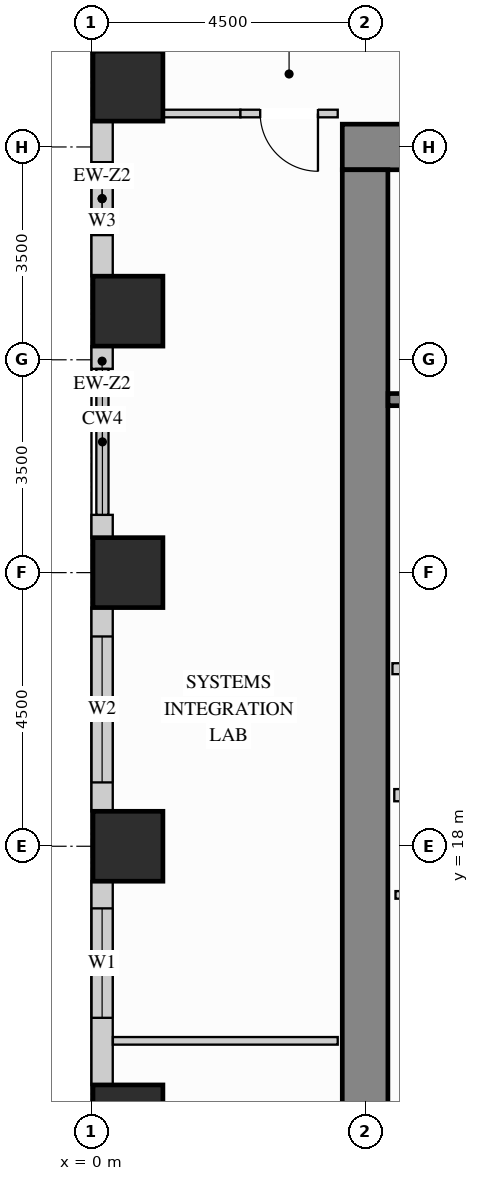
"""IFC4 building model, lengths in metres.
Left out: names, types, materials, properties, quantities, classifications, styles, units other than length and angle.
Written with IfcOpenShell. Run it as: python <this file> out.ifc"""

import sys

from ifc_helpers import new_model, si_unit, direction, frame, frame_2d, origin, origin_2d, place, context, subcontext, project, spatial, rectangle, extrude, source, transform, mapped, element, fill, save


model = new_model("IFC4")
c1 = context("Model", 3, precision=1e-05, world=origin(), true_north=direction((0.0, 1.0)))
c2 = subcontext(c1, "Body", "Model", "MODEL_VIEW")
j1 = project(units=[si_unit("LENGTHUNIT", "METRE"), si_unit("PLANEANGLEUNIT", "RADIAN")], contexts=[c1])
p1 = place(None, origin())
s1 = spatial("IfcSite", under=j1, at=p1, CompositionType="ELEMENT")
p2 = place(p1, origin())
s2 = spatial("IfcBuilding", under=s1, at=p2, CompositionType="ELEMENT")
p3 = place(p2, frame((0.0, 0.0, 77.4)))
s3 = spatial("IfcBuildingStorey", under=s2, at=p3, CompositionType="ELEMENT", Elevation=77.4)
m1 = source(origin(), c2, "Body", "SweptSolid", [
    extrude(rectangle(XDim=1.15, YDim=1.15, at=origin_2d()), origin(), (0.0, 0.0, 1.0), 3.38),
])
for number, where, z_axis, x_axis in (
    (1, (0.6, 13.5, 0.0), (0.0, 0.0, 1.0), (1.0, 0.0, 0.0)),
    (2, (0.6, 18.0, 0.0), (0.0, 0.0, 1.0), (1.0, 0.0, 0.0)),
    (3, (0.6, 22.5, 0.0), (0.0, 0.0, 1.0), (1.0, 0.0, 0.0)),
    (4, (0.6, 26.8, 0.0), (0.0, 0.0, 1.0), (1.0, 0.0, 0.0)),
    (5, (0.6, 30.5, 0.0), (0.0, 0.0, 1.0), (1.0, 0.0, 0.0)),
):
    element("IfcColumn", number, at=place(p3, frame(where, z_axis=z_axis, x_axis=x_axis)), inside=s3, PredefinedType="COLUMN", context=c2, shape_type="MappedRepresentation", body=[
        mapped(m1, transform((0.0, 0.0, 0.0), x_axis=(1.0, 0.0, 0.0), y_axis=(0.0, 1.0, 0.0), z_axis=(0.0, 0.0, 1.0))),
    ])
m2 = source(origin(), c2, "Body", "SweptSolid", [
    extrude(rectangle(XDim=10.75, YDim=0.75, at=frame_2d((5.375, 0.0))), origin(), (0.0, 0.0, 1.0), 3.38),
])
p4 = place(p3, frame((4.125, 29.5, 0.0), z_axis=(0.0, 0.0, 1.0), x_axis=(1.0, 0.0, 0.0)))
e6 = element("IfcWall", 6, at=p4, inside=s3, PredefinedType="SHEAR", context=c2, shape_type="MappedRepresentation", body=[
    mapped(m2, transform((0.0, 0.0, 0.0), x_axis=(1.0, 0.0, 0.0), y_axis=(0.0, 1.0, 0.0), z_axis=(0.0, 0.0, 1.0))),
])
m3 = source(origin(), c2, "Body", "SweptSolid", [
    extrude(rectangle(XDim=20.25, YDim=0.75, at=frame_2d((10.125, 0.0))), origin(), (0.0, 0.0, 1.0), 3.38),
])
p5 = place(p3, frame((4.5, 8.875, 0.0), z_axis=(0.0, 0.0, 1.0), x_axis=(0.0, 1.0, 0.0)))
e7 = element("IfcWall", 7, at=p5, inside=s3, PredefinedType="SHEAR", context=c2, shape_type="MappedRepresentation", body=[
    mapped(m3, transform((0.0, 0.0, 0.0), x_axis=(1.0, 0.0, 0.0), y_axis=(0.0, 1.0, 0.0), z_axis=(0.0, 0.0, 1.0))),
])
p6 = place(p3, frame((0.175, 29.927, 0.0), z_axis=(0.0, 0.0, 1.0), x_axis=(0.0, -1.0, 0.0)))
e8 = element("IfcWall", 8, at=p6, inside=s3, PredefinedType="SOLIDWALL", context=c2, shape_type="SweptSolid", body=[
    extrude(rectangle(XDim=2.554, YDim=0.35, at=frame_2d((1.277, 0.0))), origin(), (0.0, 0.0, 1.0), 3.365),
])
p7 = place(p6, frame((0.677, 0.0, 0.78)))
e9 = element("IfcOpeningElement", 9, at=p7, cuts=e8, PredefinedType="OPENING", context=c2, shape_type="SweptSolid", body=[
    extrude(rectangle(XDim=1.2, YDim=2.1, at=frame_2d((0.6, 1.05))), frame((0.0, 0.185, 0.0), z_axis=(0.0, -1.0, 0.0), x_axis=(1.0, 0.0, 0.0)), (0.0, 0.0, 1.0), 0.37),
])
m4 = source(origin(), c2, "Body", "SweptSolid", [
    extrude(rectangle(XDim=0.377, YDim=0.35, at=frame_2d((0.188, 0.0))), origin(), (0.0, 0.0, 1.0), 3.365),
])
for number, where, z_axis, x_axis in (
    (10, (0.175, 26.227, 0.0), (0.0, 0.0, 1.0), (0.0, -1.0, 0.0)),
    (11, (0.175, 23.45, 0.0), (0.0, 0.0, 1.0), (0.0, -1.0, 0.0)),
):
    element("IfcWall", number, at=place(p3, frame(where, z_axis=z_axis, x_axis=x_axis)), inside=s3, PredefinedType="SOLIDWALL", context=c2, shape_type="MappedRepresentation", body=[
        mapped(m4, transform((0.0, 0.0, 0.0), x_axis=(1.0, 0.0, 0.0), y_axis=(0.0, 1.0, 0.0), z_axis=(0.0, 0.0, 1.0))),
    ])
p8 = place(p3, frame((0.175, 21.927, 0.0), z_axis=(0.0, 0.0, 1.0), x_axis=(0.0, -1.0, 0.0)))
e12 = element("IfcWall", 12, at=p8, inside=s3, PredefinedType="SOLIDWALL", context=c2, shape_type="SweptSolid", body=[
    extrude(rectangle(XDim=3.354, YDim=0.35, at=frame_2d((1.677, 0.0))), origin(), (0.0, 0.0, 1.0), 3.365),
])
p9 = place(p8, frame((0.477, 0.0, 0.78)))
e13 = element("IfcOpeningElement", 13, at=p9, cuts=e12, PredefinedType="OPENING", context=c2, shape_type="SweptSolid", body=[
    extrude(rectangle(XDim=2.4, YDim=2.1, at=frame_2d((1.2, 1.05))), frame((0.0, 0.185, 0.0), z_axis=(0.0, -1.0, 0.0), x_axis=(1.0, 0.0, 0.0)), (0.0, 0.0, 1.0), 0.37),
])
p10 = place(p3, frame((0.175, 17.427, 0.0), z_axis=(0.0, 0.0, 1.0), x_axis=(0.0, -1.0, 0.0)))
e14 = element("IfcWall", 14, at=p10, inside=s3, PredefinedType="SOLIDWALL", context=c2, shape_type="SweptSolid", body=[
    extrude(rectangle(XDim=3.354, YDim=0.35, at=frame_2d((1.677, 0.0))), origin(), (0.0, 0.0, 1.0), 3.365),
])
p11 = place(p10, frame((0.448, 0.0, 0.78)))
e15 = element("IfcOpeningElement", 15, at=p11, cuts=e14, PredefinedType="OPENING", context=c2, shape_type="SweptSolid", body=[
    extrude(rectangle(XDim=1.8, YDim=2.1, at=frame_2d((0.9, 1.05))), frame((0.0, 0.185, 0.0), z_axis=(0.0, -1.0, 0.0), x_axis=(1.0, 0.0, 0.0)), (0.0, 0.0, 1.0), 0.37),
])
m5 = source(origin(), c2, "Body", "SweptSolid", [
    extrude(rectangle(XDim=2.2, YDim=0.18, at=frame_2d((1.1, 0.0))), origin(), (0.0, 0.0, 1.0), 3.365),
])
p12 = place(p3, frame((4.95, 20.92, 0.0), z_axis=(0.0, 0.0, 1.0), x_axis=(1.0, 0.0, 0.0)))
e16 = element("IfcWall", 16, at=p12, inside=s3, PredefinedType="PARTITIONING", context=c2, shape_type="MappedRepresentation", body=[
    mapped(m5, transform((0.0, 0.0, 0.0), x_axis=(1.0, 0.0, 0.0), y_axis=(0.0, 1.0, 0.0), z_axis=(0.0, 0.0, 1.0))),
])
p13 = place(p3, frame((5.0, 17.2, 0.0), z_axis=(0.0, 0.0, 1.0), x_axis=(1.0, 0.0, 0.0)))
e17 = element("IfcWall", 17, at=p13, inside=s3, PredefinedType="PARTITIONING", context=c2, shape_type="SweptSolid", body=[
    extrude(rectangle(XDim=2.4, YDim=0.125, at=frame_2d((1.2, 0.0))), origin(), (0.0, 0.0, 1.0), 3.365),
])
p14 = place(p13, frame((0.7, 0.0, 0.0)))
e18 = element("IfcOpeningElement", 18, at=p14, cuts=e17, PredefinedType="OPENING", context=c2, shape_type="SweptSolid", body=[
    extrude(rectangle(XDim=0.85, YDim=2.1, at=frame_2d((0.425, 1.05))), frame((0.0, 0.073, 0.0), z_axis=(0.0, -1.0, 0.0), x_axis=(1.0, 0.0, 0.0)), (0.0, 0.0, 1.0), 0.145),
])
m6 = source(origin(), c2, "Body", "SweptSolid", [
    extrude(rectangle(XDim=1.26, YDim=0.125, at=frame_2d((0.63, 0.0))), origin(), (0.0, 0.0, 1.0), 3.365),
])
p15 = place(p3, frame((1.19, 30.05, 0.0), z_axis=(0.0, 0.0, 1.0), x_axis=(1.0, 0.0, 0.0)))
e19 = element("IfcWall", 19, at=p15, inside=s3, PredefinedType="PARTITIONING", context=c2, shape_type="MappedRepresentation", body=[
    mapped(m6, transform((0.0, 0.0, 0.0), x_axis=(1.0, 0.0, 0.0), y_axis=(0.0, 1.0, 0.0), z_axis=(0.0, 0.0, 1.0))),
])
p16 = place(p3, frame((2.45, 30.05, 0.0), z_axis=(0.0, 0.0, 1.0), x_axis=(1.0, 0.0, 0.0)))
e20 = element("IfcWall", 20, at=p16, inside=s3, PredefinedType="PARTITIONING", context=c2, shape_type="SweptSolid", body=[
    extrude(rectangle(XDim=1.6, YDim=0.125, at=frame_2d((0.8, 0.0))), origin(), (0.0, 0.0, 1.0), 3.365),
])
p17 = place(p16, frame((0.325, 0.0, 0.0)))
e21 = element("IfcOpeningElement", 21, at=p17, cuts=e20, PredefinedType="OPENING", context=c2, shape_type="SweptSolid", body=[
    extrude(rectangle(XDim=0.95, YDim=2.15, at=frame_2d((0.475, 1.075))), frame((0.0, 0.073, 0.0), z_axis=(0.0, -1.0, 0.0), x_axis=(1.0, 0.0, 0.0)), (0.0, 0.0, 1.0), 0.145),
])
m7 = source(origin(), c2, "Body", "SweptSolid", [
    extrude(rectangle(XDim=3.698, YDim=0.125, at=frame_2d((1.849, 0.0))), origin(), (0.0, 0.0, 1.0), 3.365),
])
p18 = place(p3, frame((0.352, 14.8, 0.0), z_axis=(0.0, 0.0, 1.0), x_axis=(1.0, 0.0, 0.0)))
e22 = element("IfcWall", 22, at=p18, inside=s3, PredefinedType="PARTITIONING", context=c2, shape_type="MappedRepresentation", body=[
    mapped(m7, transform((0.0, 0.0, 0.0), x_axis=(1.0, 0.0, 0.0), y_axis=(0.0, 1.0, 0.0), z_axis=(0.0, 0.0, 1.0))),
])
m8 = source(origin(), c2, "Body", "SweptSolid", [
    extrude(rectangle(XDim=2.09, YDim=0.2, at=frame_2d((1.045, 0.0))), origin(), (0.0, 0.0, 1.0), 3.365),
])
p19 = place(p3, frame((4.98, 18.84, 0.0), z_axis=(0.0, 0.0, 1.0), x_axis=(1.0, 0.0, 0.0)))
e23 = element("IfcWall", 23, at=p19, inside=s3, PredefinedType="PARTITIONING", context=c2, shape_type="MappedRepresentation", body=[
    mapped(m8, transform((0.0, 0.0, 0.0), x_axis=(1.0, 0.0, 0.0), y_axis=(0.0, 1.0, 0.0), z_axis=(0.0, 0.0, 1.0))),
])
p20 = place(p3, frame((4.877, 25.345, 0.0), z_axis=(0.0, 0.0, 1.0), x_axis=(1.0, 0.0, 0.0)))
e24 = element("IfcWall", 24, at=p20, inside=s3, PredefinedType="SHEAR", context=c2, shape_type="SweptSolid", body=[
    extrude(rectangle(XDim=7.528, YDim=0.2, at=frame_2d((3.764, 0.0))), origin(), (0.0, 0.0, 1.0), 3.38),
])
p21 = place(p20, frame((0.4, 0.0, 0.0)))
e25 = element("IfcOpeningElement", 25, at=p21, cuts=e24, PredefinedType="OPENING", context=c2, shape_type="SweptSolid", body=[
    extrude(rectangle(XDim=1.1, YDim=2.15, at=frame_2d((0.55, 1.075))), frame((0.0, 0.11, 0.0), z_axis=(0.0, -1.0, 0.0), x_axis=(1.0, 0.0, 0.0)), (0.0, 0.0, 1.0), 0.22),
])
m9 = source(origin(), c2, "Body", "SweptSolid", [
    extrude(rectangle(XDim=0.95, YDim=2.15, at=frame_2d((0.475, 1.075))), frame((0.0, 0.025, 0.0), z_axis=(0.0, -1.0, 0.0), x_axis=(1.0, 0.0, 0.0)), (0.0, 0.0, 1.0), 0.05),
])
p22 = place(p17, origin())
e26 = element("IfcDoor", 26, at=p22, inside=s3, OperationType="SINGLE_SWING_RIGHT", PredefinedType="DOOR", context=c2, shape_type="MappedRepresentation", body=[
    mapped(m9, transform((0.0, 0.0, 0.0), x_axis=(1.0, 0.0, 0.0), y_axis=(0.0, 1.0, 0.0), z_axis=(0.0, 0.0, 1.0))),
])
fill(e21, e26)
m10 = source(origin(), c2, "Body", "SweptSolid", [
    extrude(rectangle(XDim=1.8, YDim=2.1, at=frame_2d((0.9, 1.05))), frame((0.0, 0.03, 0.0), z_axis=(0.0, -1.0, 0.0), x_axis=(1.0, 0.0, 0.0)), (0.0, 0.0, 1.0), 0.06),
])
p23 = place(p11, origin())
e27 = element("IfcWindow", 27, at=p23, inside=s3, PartitioningType="SINGLE_PANEL", PredefinedType="WINDOW", context=c2, shape_type="MappedRepresentation", body=[
    mapped(m10, transform((0.0, 0.0, 0.0), x_axis=(1.0, 0.0, 0.0), y_axis=(0.0, 1.0, 0.0), z_axis=(0.0, 0.0, 1.0))),
])
fill(e15, e27)
m11 = source(origin(), c2, "Body", "SweptSolid", [
    extrude(rectangle(XDim=2.4, YDim=2.1, at=frame_2d((1.2, 1.05))), frame((0.0, 0.03, 0.0), z_axis=(0.0, -1.0, 0.0), x_axis=(1.0, 0.0, 0.0)), (0.0, 0.0, 1.0), 0.06),
])
p24 = place(p9, origin())
e28 = element("IfcWindow", 28, at=p24, inside=s3, PartitioningType="SINGLE_PANEL", PredefinedType="WINDOW", context=c2, shape_type="MappedRepresentation", body=[
    mapped(m11, transform((0.0, 0.0, 0.0), x_axis=(1.0, 0.0, 0.0), y_axis=(0.0, 1.0, 0.0), z_axis=(0.0, 0.0, 1.0))),
])
fill(e13, e28)
m12 = source(origin(), c2, "Body", "SweptSolid", [
    extrude(rectangle(XDim=1.2, YDim=2.1, at=frame_2d((0.6, 1.05))), frame((0.0, 0.03, 0.0), z_axis=(0.0, -1.0, 0.0), x_axis=(1.0, 0.0, 0.0)), (0.0, 0.0, 1.0), 0.06),
])
p25 = place(p7, origin())
e29 = element("IfcWindow", 29, at=p25, inside=s3, PartitioningType="SINGLE_PANEL", PredefinedType="WINDOW", context=c2, shape_type="MappedRepresentation", body=[
    mapped(m12, transform((0.0, 0.0, 0.0), x_axis=(1.0, 0.0, 0.0), y_axis=(0.0, 1.0, 0.0), z_axis=(0.0, 0.0, 1.0))),
])
fill(e9, e29)
save(model, sys.argv[1])
